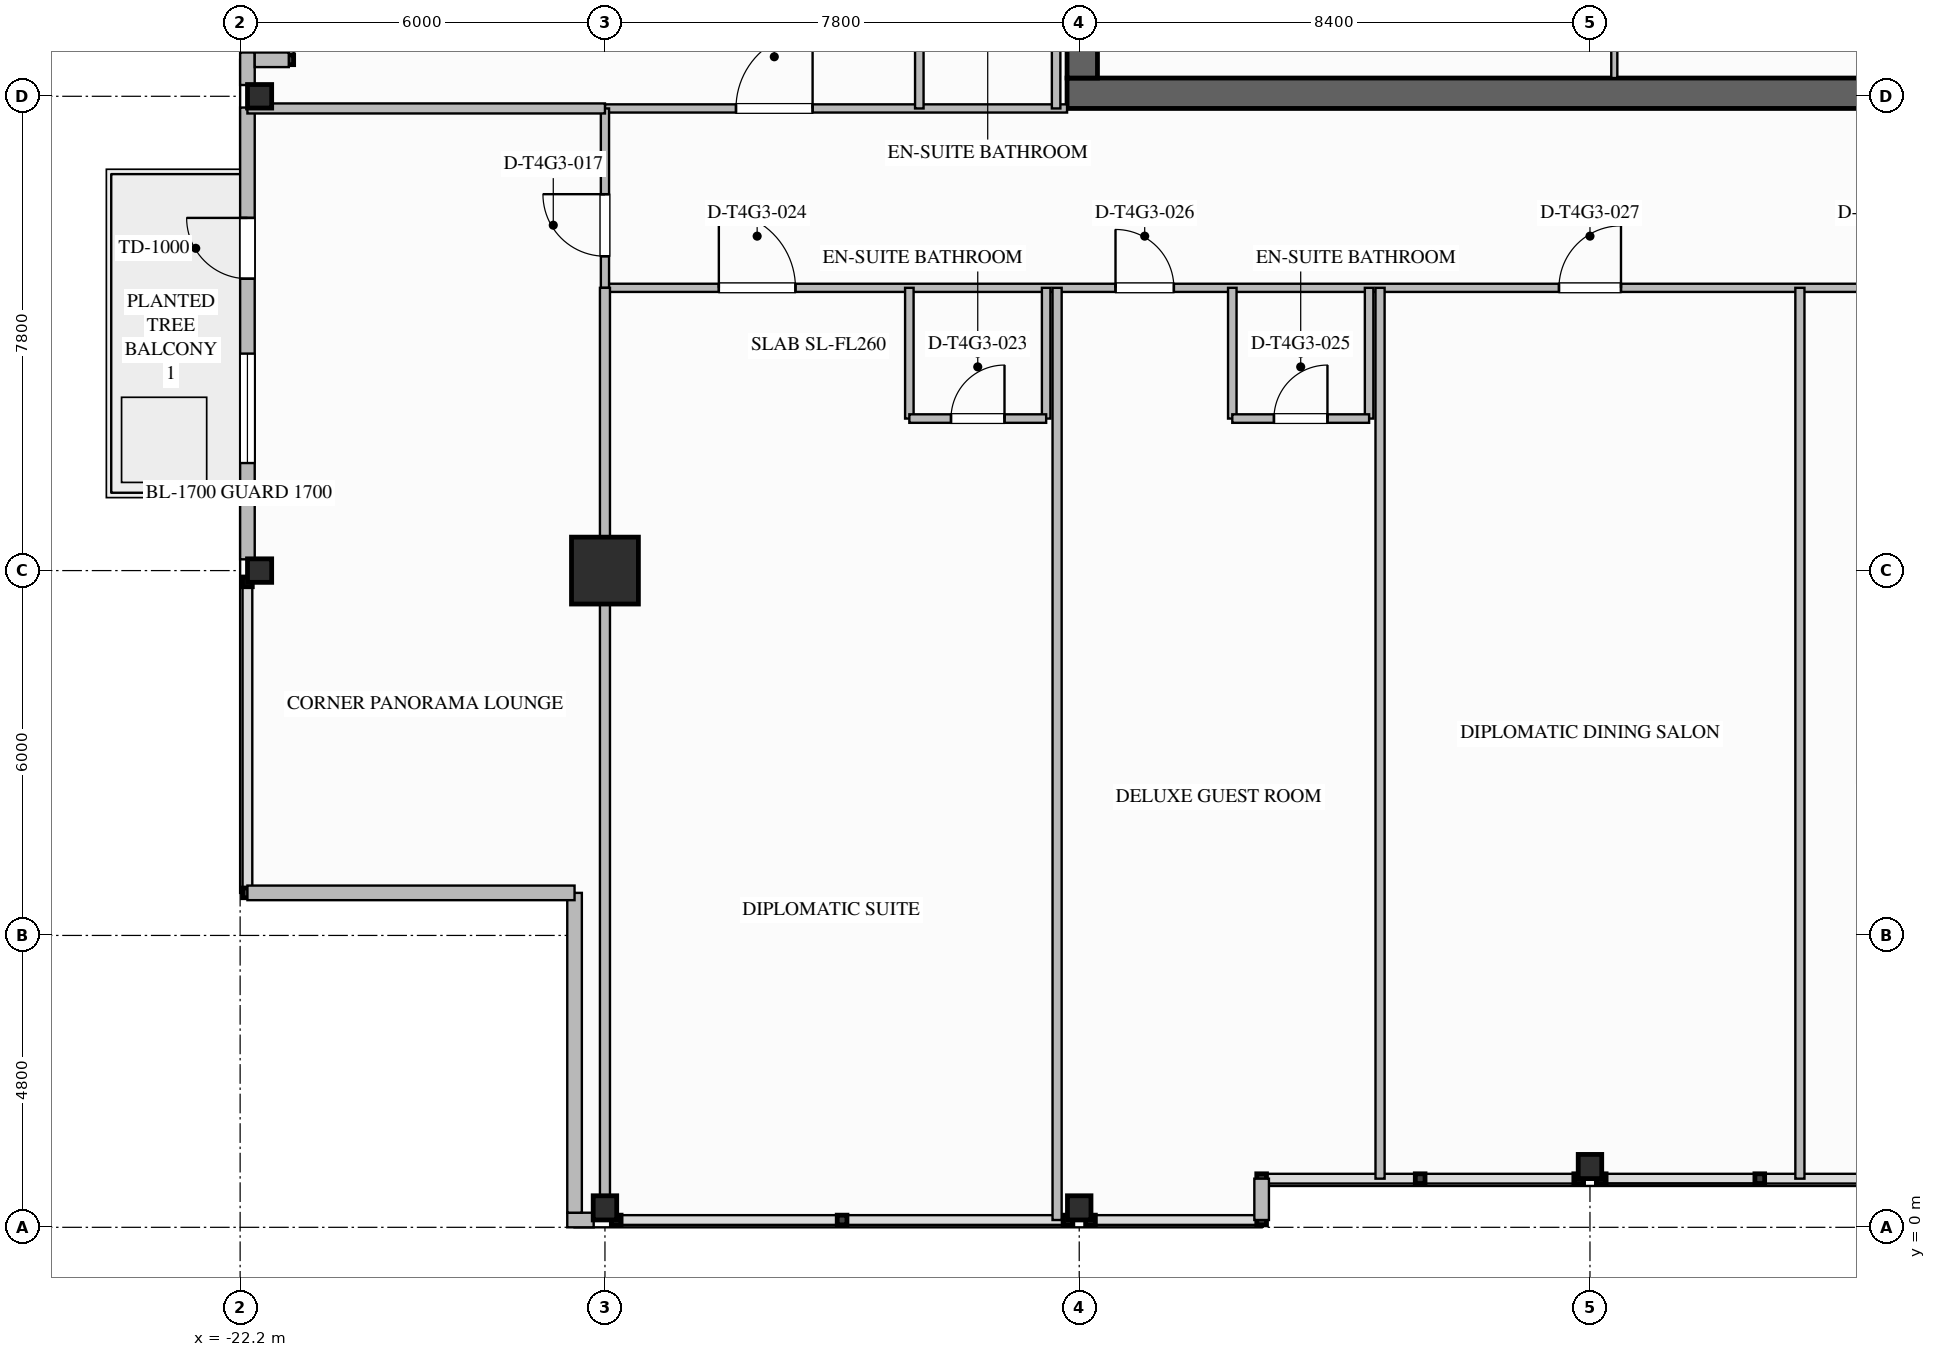
"""IFC4 building model, lengths in metres.
Left out: names, types, materials, properties, quantities, classifications, styles, units other than length and angle.
Written with IfcOpenShell. Run it as: python <this file> out.ifc"""

import sys

from ifc_helpers import new_model, si_unit, direction, frame, frame_2d, origin, origin_2d, place, context, subcontext, project, spatial, rectangle, i_section, extrude, element, fill, save


model = new_model("IFC4")
c1 = context("Model", 3, precision=1e-05, world=origin(), true_north=direction((0.0, 1.0)))
c2 = subcontext(c1, "Body", "Model", "MODEL_VIEW")
j1 = project(units=[si_unit("LENGTHUNIT", "METRE"), si_unit("PLANEANGLEUNIT", "RADIAN")], contexts=[c1])
p1 = place(None, origin())
s1 = spatial("IfcSite", under=j1, at=p1, CompositionType="ELEMENT")
p2 = place(p1, origin())
s2 = spatial("IfcBuilding", under=s1, at=p2, CompositionType="ELEMENT")
p3 = place(p2, frame((0.0, 0.0, 226.7)))
s3 = spatial("IfcBuildingStorey", under=s2, at=p3, CompositionType="ELEMENT", Elevation=226.7)
p4 = place(p3, frame((8.6, 18.65, 0.0), z_axis=(0.0, 0.0, 1.0), x_axis=(-1.0, 0.0, 0.0)))
e1 = element("IfcWall", 1, at=p4, inside=s3, PredefinedType="SHEAR", context=c2, shape_type="SweptSolid", body=[
    extrude(rectangle(XDim=17.2, YDim=0.5, at=frame_2d((8.6, 0.0))), origin(), (0.0, 0.0, 1.0), 3.6),
])
p5 = place(p3, frame((-8.35, 18.9, 0.0), z_axis=(0.0, 0.0, 1.0), x_axis=(0.0, 1.0, 0.0)))
e2 = element("IfcWall", 2, at=p5, inside=s3, PredefinedType="SHEAR", context=c2, shape_type="SweptSolid", body=[
    extrude(rectangle(XDim=16.2, YDim=0.5, at=frame_2d((8.1, 0.0))), origin(), (0.0, 0.0, 1.0), 3.6),
])
p6 = place(p3, frame((-16.2, 10.8, 0.0), z_axis=(0.0, 0.0, 1.0), x_axis=(1.0, 0.0, 0.0)))
e3 = element("IfcColumn", 3, at=p6, inside=s3, PredefinedType="COLUMN", context=c2, shape_type="SweptSolid", body=[
    extrude(rectangle(XDim=1.1, YDim=1.1, at=origin_2d()), origin(), (0.0, 0.0, 1.0), 3.6),
])
for number, where, z_axis, x_axis in (
    (4, (-21.88, 10.8, 0.0), (0.0, 0.0, 1.0), (1.0, 0.0, 0.0)),
    (5, (-21.88, 18.6, 0.0), (0.0, 0.0, 1.0), (1.0, 0.0, 0.0)),
    (6, (-16.2, 0.32, 0.0), (0.0, 0.0, 1.0), (0.0, 1.0, 0.0)),
    (7, (-8.4, 0.32, 0.0), (0.0, 0.0, 1.0), (0.0, 1.0, 0.0)),
    (8, (0.0, 1.0, 0.0), (0.0, 0.0, 1.0), (0.0, 1.0, 0.0)),
):
    element("IfcColumn", number, at=place(p3, frame(where, z_axis=z_axis, x_axis=x_axis)), inside=s3, PredefinedType="COLUMN", context=c2, shape_type="SweptSolid", body=[
        extrude(i_section(OverallWidth=0.397, OverallDepth=0.387, WebThickness=0.021, FlangeThickness=0.033, FilletRadius=0.025, at=origin_2d()), origin(), (0.0, 0.0, 1.0), 3.597),
    ])
p7 = place(p3, frame((-22.08, 10.985, 0.0), z_axis=(0.0, 0.0, 1.0), x_axis=(0.0, 1.0, 0.0)))
e9 = element("IfcWall", 9, at=p7, inside=s3, PredefinedType="STANDARD", context=c2, shape_type="SweptSolid", body=[
    extrude(rectangle(XDim=7.429, YDim=0.24, at=frame_2d((3.715, 0.0))), origin(), (0.0, 0.0, 1.0), 2.803),
])
p8 = place(p7, frame((4.615, 0.0, 0.0)))
e10 = element("IfcOpeningElement", 10, at=p8, cuts=e9, PredefinedType="OPENING", context=c2, shape_type="SweptSolid", body=[
    extrude(rectangle(XDim=1.0, YDim=2.2, at=frame_2d((0.5, 1.1))), frame((0.0, 0.13, 0.0), z_axis=(0.0, -1.0, 0.0), x_axis=(1.0, 0.0, 0.0)), (0.0, 0.0, 1.0), 0.26),
])
p9 = place(p7, frame((1.583, 0.0, 0.75)))
e11 = element("IfcOpeningElement", 11, at=p9, cuts=e9, PredefinedType="OPENING", context=c2, shape_type="SweptSolid", body=[
    extrude(rectangle(XDim=1.8, YDim=1.953, at=frame_2d((0.9, 0.977))), frame((0.0, 0.13, 0.0), z_axis=(0.0, -1.0, 0.0), x_axis=(1.0, 0.0, 0.0)), (0.0, 0.0, 1.0), 0.26),
])
p10 = place(p3, frame((-22.08, 18.785, 0.0), z_axis=(0.0, 0.0, 1.0), x_axis=(0.0, 1.0, 0.0)))
e12 = element("IfcWall", 12, at=p10, inside=s3, PredefinedType="STANDARD", context=c2, shape_type="SweptSolid", body=[
    extrude(rectangle(XDim=0.535, YDim=0.24, at=frame_2d((0.267, 0.0))), origin(), (0.0, 0.0, 1.0), 3.34),
])
p11 = place(p3, frame((-16.385, 0.12, 0.0), z_axis=(0.0, 0.0, 1.0), x_axis=(-1.0, 0.0, 0.0)))
e13 = element("IfcWall", 13, at=p11, inside=s3, PredefinedType="STANDARD", context=c2, shape_type="SweptSolid", body=[
    extrude(rectangle(XDim=0.435, YDim=0.24, at=frame_2d((0.217, 0.0))), origin(), (0.0, 0.0, 1.0), 3.34),
])
p12 = place(p3, frame((-16.7, 0.24, 0.0), z_axis=(0.0, 0.0, 1.0), x_axis=(0.0, 1.0, 0.0)))
e14 = element("IfcWall", 14, at=p12, inside=s3, PredefinedType="STANDARD", context=c2, shape_type="SweptSolid", body=[
    extrude(rectangle(XDim=5.26, YDim=0.24, at=frame_2d((2.63, 0.0))), origin(), (0.0, 0.0, 1.0), 3.34),
])
p13 = place(p3, frame((-16.7, 5.5, 0.0), z_axis=(0.0, 0.0, 1.0), x_axis=(-1.0, 0.0, 0.0)))
e15 = element("IfcWall", 15, at=p13, inside=s3, PredefinedType="STANDARD", context=c2, shape_type="SweptSolid", body=[
    extrude(rectangle(XDim=5.38, YDim=0.24, at=frame_2d((2.69, 0.0))), origin(), (0.0, 0.0, 1.0), 3.34),
])
p14 = place(p3, frame((-21.96, 19.2, 0.0), z_axis=(0.0, 0.0, 1.0), x_axis=(1.0, 0.0, 0.0)))
e16 = element("IfcWall", 16, at=p14, inside=s3, PredefinedType="STANDARD", context=c2, shape_type="SweptSolid", body=[
    extrude(rectangle(XDim=0.56, YDim=0.24, at=frame_2d((0.28, 0.0))), origin(), (0.0, 0.0, 1.0), 3.34),
])
p15 = place(p3, frame((-5.4, 0.8, 0.0), z_axis=(0.0, 0.0, 1.0), x_axis=(0.0, -1.0, 0.0)))
e17 = element("IfcWall", 17, at=p15, inside=s3, PredefinedType="STANDARD", context=c2, shape_type="SweptSolid", body=[
    extrude(rectangle(XDim=0.68, YDim=0.24, at=frame_2d((0.34, 0.0))), origin(), (0.0, 0.0, 1.0), 3.34),
])
p16 = place(p3, frame((0.4, 18.9, 0.0), z_axis=(0.0, 0.0, 1.0), x_axis=(0.0, 1.0, 0.0)))
e18 = element("IfcWall", 18, at=p16, inside=s3, PredefinedType="PARTITIONING", context=c2, shape_type="SweptSolid", body=[
    extrude(rectangle(XDim=4.3, YDim=0.1, at=frame_2d((2.15, 0.0))), origin(), (0.0, 0.0, 1.0), 3.34),
])
p17 = place(p3, frame((-16.2, 15.45, 0.0), z_axis=(0.0, 0.0, 1.0), x_axis=(1.0, 0.0, 0.0)))
e19 = element("IfcWall", 19, at=p17, inside=s3, PredefinedType="PARTITIONING", context=c2, shape_type="SweptSolid", body=[
    extrude(rectangle(XDim=38.28, YDim=0.135, at=frame_2d((19.14, 0.0))), origin(), (0.0, 0.0, 1.0), 3.34),
])
p18 = place(p17, frame((33.355, 0.0, 0.0)))
e20 = element("IfcOpeningElement", 20, at=p18, cuts=e19, PredefinedType="OPENING", context=c2, shape_type="SweptSolid", body=[
    extrude(rectangle(XDim=1.26, YDim=2.2, at=frame_2d((0.63, 1.1))), frame((0.0, 0.077, 0.0), z_axis=(0.0, -1.0, 0.0), x_axis=(1.0, 0.0, 0.0)), (0.0, 0.0, 1.0), 0.155),
])
p19 = place(p17, frame((1.873, 0.0, 0.0)))
e21 = element("IfcOpeningElement", 21, at=p19, cuts=e19, PredefinedType="OPENING", context=c2, shape_type="SweptSolid", body=[
    extrude(rectangle(XDim=1.26, YDim=2.2, at=frame_2d((0.63, 1.1))), frame((0.0, 0.077, 0.0), z_axis=(0.0, -1.0, 0.0), x_axis=(1.0, 0.0, 0.0)), (0.0, 0.0, 1.0), 0.155),
])
p20 = place(p17, frame((8.397, 0.0, 0.0)))
e22 = element("IfcOpeningElement", 22, at=p20, cuts=e19, PredefinedType="OPENING", context=c2, shape_type="SweptSolid", body=[
    extrude(rectangle(XDim=0.96, YDim=2.15, at=frame_2d((0.48, 1.075))), frame((0.0, 0.077, 0.0), z_axis=(0.0, -1.0, 0.0), x_axis=(1.0, 0.0, 0.0)), (0.0, 0.0, 1.0), 0.155),
])
p21 = place(p17, frame((15.69, 0.0, 0.0)))
e23 = element("IfcOpeningElement", 23, at=p21, cuts=e19, PredefinedType="OPENING", context=c2, shape_type="SweptSolid", body=[
    extrude(rectangle(XDim=1.02, YDim=2.15, at=frame_2d((0.51, 1.075))), frame((0.0, 0.077, 0.0), z_axis=(0.0, -1.0, 0.0), x_axis=(1.0, 0.0, 0.0)), (0.0, 0.0, 1.0), 0.155),
])
p22 = place(p17, frame((20.613, 0.0, 0.0)))
e24 = element("IfcOpeningElement", 24, at=p22, cuts=e19, PredefinedType="OPENING", context=c2, shape_type="SweptSolid", body=[
    extrude(rectangle(XDim=0.96, YDim=2.15, at=frame_2d((0.48, 1.075))), frame((0.0, 0.077, 0.0), z_axis=(0.0, -1.0, 0.0), x_axis=(1.0, 0.0, 0.0)), (0.0, 0.0, 1.0), 0.155),
])
p23 = place(p17, frame((26.837, 0.0, 0.0)))
e25 = element("IfcOpeningElement", 25, at=p23, cuts=e19, PredefinedType="OPENING", context=c2, shape_type="SweptSolid", body=[
    extrude(rectangle(XDim=1.26, YDim=2.2, at=frame_2d((0.63, 1.1))), frame((0.0, 0.077, 0.0), z_axis=(0.0, -1.0, 0.0), x_axis=(1.0, 0.0, 0.0)), (0.0, 0.0, 1.0), 0.155),
])
p24 = place(p3, frame((-16.2, 18.4, 0.0), z_axis=(0.0, 0.0, 1.0), x_axis=(1.0, 0.0, 0.0)))
e26 = element("IfcWall", 26, at=p24, inside=s3, PredefinedType="PARTITIONING", context=c2, shape_type="SweptSolid", body=[
    extrude(rectangle(XDim=7.6, YDim=0.135, at=frame_2d((3.8, 0.0))), origin(), (0.0, 0.0, 1.0), 2.718),
])
p25 = place(p24, frame((2.155, 0.0, 0.0)))
e27 = element("IfcOpeningElement", 27, at=p25, cuts=e26, PredefinedType="OPENING", context=c2, shape_type="SweptSolid", body=[
    extrude(rectangle(XDim=1.26, YDim=2.2, at=frame_2d((0.63, 1.1))), frame((0.0, 0.077, 0.0), z_axis=(0.0, -1.0, 0.0), x_axis=(1.0, 0.0, 0.0)), (0.0, 0.0, 1.0), 0.155),
])
p26 = place(p3, frame((-16.2, 15.45, 0.0), z_axis=(0.0, 0.0, 1.0), x_axis=(0.0, 1.0, 0.0)))
e28 = element("IfcWall", 28, at=p26, inside=s3, PredefinedType="PARTITIONING", context=c2, shape_type="SweptSolid", body=[
    extrude(rectangle(XDim=2.95, YDim=0.135, at=frame_2d((1.475, 0.0))), origin(), (0.0, 0.0, 1.0), 2.714),
])
p27 = place(p26, frame((0.52, 0.0, 0.0)))
e29 = element("IfcOpeningElement", 29, at=p27, cuts=e28, PredefinedType="OPENING", context=c2, shape_type="SweptSolid", body=[
    extrude(rectangle(XDim=1.02, YDim=2.15, at=frame_2d((0.51, 1.075))), frame((0.0, 0.077, 0.0), z_axis=(0.0, -1.0, 0.0), x_axis=(1.0, 0.0, 0.0)), (0.0, 0.0, 1.0), 0.155),
])
p28 = place(p3, frame((-16.2, 0.12, 0.0), z_axis=(0.0, 0.0, 1.0), x_axis=(0.0, 1.0, 0.0)))
e30 = element("IfcWall", 30, at=p28, inside=s3, PredefinedType="PARTITIONING", context=c2, shape_type="SweptSolid", body=[
    extrude(rectangle(XDim=15.33, YDim=0.165, at=frame_2d((7.665, 0.0))), origin(), (0.0, 0.0, 1.0), 2.714),
])
p29 = place(p3, frame((-22.08, 18.4, 0.0), z_axis=(0.0, 0.0, 1.0), x_axis=(1.0, 0.0, 0.0)))
e31 = element("IfcWall", 31, at=p29, inside=s3, PredefinedType="PARTITIONING", context=c2, shape_type="SweptSolid", body=[
    extrude(rectangle(XDim=5.88, YDim=0.165, at=frame_2d((2.94, 0.0))), origin(), (0.0, 0.0, 1.0), 2.714),
])
for number, where, z_axis, x_axis in (
    (32, (-11.194, 15.45, 0.0), (0.0, 0.0, 1.0), (0.0, -1.0, 0.0)),
    (33, (-8.944, 15.45, 0.0), (0.0, 0.0, 1.0), (0.0, -1.0, 0.0)),
):
    element("IfcWall", number, at=place(p3, frame(where, z_axis=z_axis, x_axis=x_axis)), inside=s3, PredefinedType="PLUMBINGWALL", context=c2, shape_type="SweptSolid", body=[
        extrude(rectangle(XDim=2.15, YDim=0.14, at=frame_2d((1.075, 0.0))), origin(), (0.0, 0.0, 1.0), 3.34),
    ])
p30 = place(p3, frame((-11.194, 13.3, 0.0), z_axis=(0.0, 0.0, 1.0), x_axis=(1.0, 0.0, 0.0)))
e34 = element("IfcWall", 34, at=p30, inside=s3, PredefinedType="PLUMBINGWALL", context=c2, shape_type="SweptSolid", body=[
    extrude(rectangle(XDim=2.25, YDim=0.14, at=frame_2d((1.125, 0.0))), origin(), (0.0, 0.0, 1.0), 3.34),
])
p31 = place(p30, frame((0.685, 0.0, 0.0)))
e35 = element("IfcOpeningElement", 35, at=p31, cuts=e34, PredefinedType="OPENING", context=c2, shape_type="SweptSolid", body=[
    extrude(rectangle(XDim=0.88, YDim=2.1, at=frame_2d((0.44, 1.05))), frame((0.0, 0.08, 0.0), z_axis=(0.0, -1.0, 0.0), x_axis=(1.0, 0.0, 0.0)), (0.0, 0.0, 1.0), 0.16),
])
p32 = place(p3, frame((-8.764, 0.12, 0.0), z_axis=(0.0, 0.0, 1.0), x_axis=(0.0, 1.0, 0.0)))
e36 = element("IfcWall", 36, at=p32, inside=s3, PredefinedType="PARTITIONING", context=c2, shape_type="SweptSolid", body=[
    extrude(rectangle(XDim=15.33, YDim=0.15, at=frame_2d((7.665, 0.0))), origin(), (0.0, 0.0, 1.0), 3.34),
])
for number, where, z_axis, x_axis in (
    (37, (-5.883, 15.45, 0.0), (0.0, 0.0, 1.0), (0.0, -1.0, 0.0)),
    (38, (-3.633, 15.45, 0.0), (0.0, 0.0, 1.0), (0.0, -1.0, 0.0)),
):
    element("IfcWall", number, at=place(p3, frame(where, z_axis=z_axis, x_axis=x_axis)), inside=s3, PredefinedType="PLUMBINGWALL", context=c2, shape_type="SweptSolid", body=[
        extrude(rectangle(XDim=2.15, YDim=0.14, at=frame_2d((1.075, 0.0))), origin(), (0.0, 0.0, 1.0), 3.34),
    ])
p33 = place(p3, frame((-5.883, 13.3, 0.0), z_axis=(0.0, 0.0, 1.0), x_axis=(1.0, 0.0, 0.0)))
e39 = element("IfcWall", 39, at=p33, inside=s3, PredefinedType="PLUMBINGWALL", context=c2, shape_type="SweptSolid", body=[
    extrude(rectangle(XDim=2.25, YDim=0.14, at=frame_2d((1.125, 0.0))), origin(), (0.0, 0.0, 1.0), 3.34),
])
p34 = place(p33, frame((0.685, 0.0, 0.0)))
e40 = element("IfcOpeningElement", 40, at=p34, cuts=e39, PredefinedType="OPENING", context=c2, shape_type="SweptSolid", body=[
    extrude(rectangle(XDim=0.88, YDim=2.1, at=frame_2d((0.44, 1.05))), frame((0.0, 0.08, 0.0), z_axis=(0.0, -1.0, 0.0), x_axis=(1.0, 0.0, 0.0)), (0.0, 0.0, 1.0), 0.16),
])
for number, where, z_axis, x_axis in (
    (41, (-3.452, 0.8, 0.0), (0.0, 0.0, 1.0), (0.0, 1.0, 0.0)),
    (42, (3.452, 0.8, 0.0), (0.0, 0.0, 1.0), (0.0, 1.0, 0.0)),
):
    element("IfcWall", number, at=place(p3, frame(where, z_axis=z_axis, x_axis=x_axis)), inside=s3, PredefinedType="PARTITIONING", context=c2, shape_type="SweptSolid", body=[
        extrude(rectangle(XDim=14.65, YDim=0.15, at=frame_2d((7.325, 0.0))), origin(), (0.0, 0.0, 1.0), 3.34),
    ])
for number, where, z_axis, x_axis in (
    (43, (-11.03, 18.4, 0.0), (0.0, 0.0, 1.0), (0.0, 1.0, 0.0)),
    (44, (-8.78, 18.4, 0.0), (0.0, 0.0, 1.0), (0.0, 1.0, 0.0)),
):
    element("IfcWall", number, at=place(p3, frame(where, z_axis=z_axis, x_axis=x_axis)), inside=s3, PredefinedType="PLUMBINGWALL", context=c2, shape_type="SweptSolid", body=[
        extrude(rectangle(XDim=2.15, YDim=0.14, at=frame_2d((1.075, 0.0))), origin(), (0.0, 0.0, 1.0), 3.34),
    ])
p35 = place(p8, origin())
e45 = element("IfcDoor", 45, at=p35, inside=s3, OperationType="SINGLE_SWING_RIGHT", PredefinedType="DOOR", context=c2, shape_type="SweptSolid", body=[
    extrude(rectangle(XDim=1.0, YDim=2.2, at=frame_2d((0.5, 1.1))), frame((0.0, 0.025, 0.0), z_axis=(0.0, -1.0, 0.0), x_axis=(1.0, 0.0, 0.0)), (0.0, 0.0, 1.0), 0.05),
])
fill(e10, e45)
p36 = place(p9, origin())
e46 = element("IfcWindow", 46, at=p36, inside=s3, PartitioningType="SINGLE_PANEL", PredefinedType="WINDOW", context=c2, shape_type="SweptSolid", body=[
    extrude(rectangle(XDim=1.8, YDim=1.953, at=frame_2d((0.9, 0.977))), frame((0.0, 0.03, 0.0), z_axis=(0.0, -1.0, 0.0), x_axis=(1.0, 0.0, 0.0)), (0.0, 0.0, 1.0), 0.06),
])
fill(e11, e46)
p37 = place(p27, origin())
e47 = element("IfcDoor", 47, at=p37, inside=s3, OperationType="SINGLE_SWING_RIGHT", PredefinedType="DOOR", context=c2, shape_type="SweptSolid", body=[
    extrude(rectangle(XDim=1.02, YDim=2.15, at=frame_2d((0.51, 1.075))), frame((0.0, 0.025, 0.0), z_axis=(0.0, -1.0, 0.0), x_axis=(1.0, 0.0, 0.0)), (0.0, 0.0, 1.0), 0.05),
])
fill(e29, e47)
p38 = place(p31, origin())
e48 = element("IfcDoor", 48, at=p38, inside=s3, OperationType="SINGLE_SWING_RIGHT", PredefinedType="DOOR", context=c2, shape_type="SweptSolid", body=[
    extrude(rectangle(XDim=0.88, YDim=2.1, at=frame_2d((0.44, 1.05))), frame((0.0, 0.025, 0.0), z_axis=(0.0, -1.0, 0.0), x_axis=(1.0, 0.0, 0.0)), (0.0, 0.0, 1.0), 0.05),
])
fill(e35, e48)
p39 = place(p19, origin())
e49 = element("IfcDoor", 49, at=p39, inside=s3, OperationType="SINGLE_SWING_LEFT", PredefinedType="DOOR", context=c2, shape_type="SweptSolid", body=[
    extrude(rectangle(XDim=1.26, YDim=2.2, at=frame_2d((0.63, 1.1))), frame((0.0, 0.025, 0.0), z_axis=(0.0, -1.0, 0.0), x_axis=(1.0, 0.0, 0.0)), (0.0, 0.0, 1.0), 0.05),
])
fill(e21, e49)
p40 = place(p34, origin())
e50 = element("IfcDoor", 50, at=p40, inside=s3, OperationType="SINGLE_SWING_RIGHT", PredefinedType="DOOR", context=c2, shape_type="SweptSolid", body=[
    extrude(rectangle(XDim=0.88, YDim=2.1, at=frame_2d((0.44, 1.05))), frame((0.0, 0.025, 0.0), z_axis=(0.0, -1.0, 0.0), x_axis=(1.0, 0.0, 0.0)), (0.0, 0.0, 1.0), 0.05),
])
fill(e40, e50)
p41 = place(p20, origin())
e51 = element("IfcDoor", 51, at=p41, inside=s3, OperationType="SINGLE_SWING_LEFT", PredefinedType="DOOR", context=c2, shape_type="SweptSolid", body=[
    extrude(rectangle(XDim=0.96, YDim=2.15, at=frame_2d((0.48, 1.075))), frame((0.0, 0.025, 0.0), z_axis=(0.0, -1.0, 0.0), x_axis=(1.0, 0.0, 0.0)), (0.0, 0.0, 1.0), 0.05),
])
fill(e22, e51)
p42 = place(p21, origin())
e52 = element("IfcDoor", 52, at=p42, inside=s3, OperationType="SINGLE_SWING_RIGHT", PredefinedType="DOOR", context=c2, shape_type="SweptSolid", body=[
    extrude(rectangle(XDim=1.02, YDim=2.15, at=frame_2d((0.51, 1.075))), frame((0.0, 0.025, 0.0), z_axis=(0.0, -1.0, 0.0), x_axis=(1.0, 0.0, 0.0)), (0.0, 0.0, 1.0), 0.05),
])
fill(e23, e52)
p43 = place(p25, origin())
e53 = element("IfcDoor", 53, at=p43, inside=s3, OperationType="SINGLE_SWING_RIGHT", PredefinedType="DOOR", context=c2, shape_type="SweptSolid", body=[
    extrude(rectangle(XDim=1.26, YDim=2.2, at=frame_2d((0.63, 1.1))), frame((0.0, 0.025, 0.0), z_axis=(0.0, -1.0, 0.0), x_axis=(1.0, 0.0, 0.0)), (0.0, 0.0, 1.0), 0.05),
])
fill(e27, e53)
save(model, sys.argv[1])
